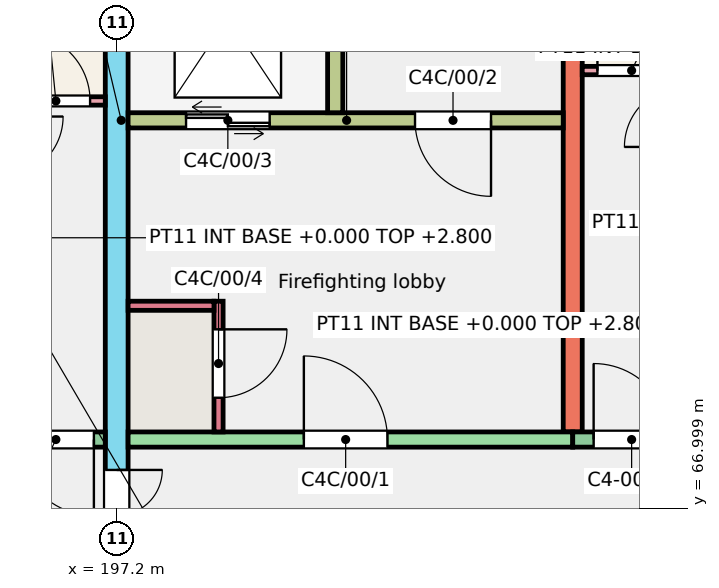
"""IFC4 building model, lengths in metres.
Left out: names, types, materials, properties, quantities, classifications, styles, units other than length and angle.
Written with IfcOpenShell. Run it as: python <this file> out.ifc"""

import sys

from ifc_helpers import new_model, si_unit, direction, frame, frame_2d, origin, place, context, subcontext, project, spatial, rectangle, extrude, element, fill, save


model = new_model("IFC4")
c1 = context("Model", 3, precision=1e-05, world=origin(), true_north=direction((0.0, 1.0)))
c2 = subcontext(c1, "Body", "Model", "MODEL_VIEW")
j1 = project(units=[si_unit("LENGTHUNIT", "METRE"), si_unit("PLANEANGLEUNIT", "RADIAN")], contexts=[c1])
p1 = place(None, origin())
s1 = spatial("IfcSite", under=j1, at=p1, CompositionType="ELEMENT")
p2 = place(p1, origin())
s2 = spatial("IfcBuilding", under=s1, at=p2, CompositionType="ELEMENT")
p3 = place(p2, origin())
s3 = spatial("IfcBuildingStorey", under=s2, at=p3, CompositionType="ELEMENT", Elevation=0.0)
p4 = place(p3, frame((197.2, 66.0, -0.25), z_axis=(0.0, 0.0, 1.0), x_axis=(0.0, 1.0, 0.0)))
e1 = element("IfcWall", 1, at=p4, inside=s3, PredefinedType="SHEAR", context=c2, shape_type="SweptSolid", body=[
    extrude(rectangle(XDim=11.0, YDim=0.3, at=frame_2d((5.5, 0.0))), origin(), (0.0, 0.0, 1.0), 3.25),
])
p5 = place(p4, frame((0.3, 0.0, 0.25)))
e2 = element("IfcOpeningElement", 2, at=p5, cuts=e1, PredefinedType="OPENING", context=c2, shape_type="SweptSolid", body=[
    extrude(rectangle(XDim=1.2, YDim=2.1, at=frame_2d((0.6, 1.05))), frame((0.0, 0.16, 0.0), z_axis=(0.0, -1.0, 0.0), x_axis=(1.0, 0.0, 0.0)), (0.0, 0.0, 1.0), 0.32),
])
p6 = place(p3, frame((203.2, 68.0, -0.25), z_axis=(0.0, 0.0, 1.0), x_axis=(0.0, 1.0, 0.0)))
e3 = element("IfcWall", 3, at=p6, inside=s3, PredefinedType="SHEAR", context=c2, shape_type="SweptSolid", body=[
    extrude(rectangle(XDim=9.0, YDim=0.25, at=frame_2d((4.5, 0.0))), origin(), (0.0, 0.0, 1.0), 3.25),
])
p7 = place(p3, frame((193.6, 67.9, -0.25), z_axis=(0.0, 0.0, 1.0), x_axis=(1.0, 0.0, 0.0)))
e4 = element("IfcWall", 4, at=p7, inside=s3, PredefinedType="SOLIDWALL", context=c2, shape_type="SweptSolid", body=[
    extrude(rectangle(XDim=3.45, YDim=0.2, at=frame_2d((1.725, 0.0))), origin(), (0.0, 0.0, 1.0), 3.25),
])
p8 = place(p7, frame((0.482, 0.0, 1.35)))
e5 = element("IfcOpeningElement", 5, at=p8, cuts=e4, PredefinedType="OPENING", context=c2, shape_type="SweptSolid", body=[
    extrude(rectangle(XDim=1.2, YDim=1.3, at=frame_2d((0.6, 0.65))), frame((0.0, 0.11, 0.0), z_axis=(0.0, -1.0, 0.0), x_axis=(1.0, 0.0, 0.0)), (0.0, 0.0, 1.0), 0.22),
])
p9 = place(p7, frame((2.3, 0.0, 0.25)))
e6 = element("IfcOpeningElement", 6, at=p9, cuts=e4, PredefinedType="OPENING", context=c2, shape_type="SweptSolid", body=[
    extrude(rectangle(XDim=1.0, YDim=2.1, at=frame_2d((0.5, 1.05))), frame((0.0, 0.11, 0.0), z_axis=(0.0, -1.0, 0.0), x_axis=(1.0, 0.0, 0.0)), (0.0, 0.0, 1.0), 0.22),
])
p10 = place(p3, frame((197.35, 67.9, -0.25), z_axis=(0.0, 0.0, 1.0), x_axis=(1.0, 0.0, 0.0)))
e7 = element("IfcWall", 7, at=p10, inside=s3, PredefinedType="SHEAR", context=c2, shape_type="SweptSolid", body=[
    extrude(rectangle(XDim=5.85, YDim=0.2, at=frame_2d((2.925, 0.0))), origin(), (0.0, 0.0, 1.0), 3.25),
])
p11 = place(p10, frame((2.312, 0.0, 0.25)))
e8 = element("IfcOpeningElement", 8, at=p11, cuts=e7, PredefinedType="OPENING", context=c2, shape_type="SweptSolid", body=[
    extrude(rectangle(XDim=1.1, YDim=2.1, at=frame_2d((0.55, 1.05))), frame((0.0, 0.11, 0.0), z_axis=(0.0, -1.0, 0.0), x_axis=(1.0, 0.0, 0.0)), (0.0, 0.0, 1.0), 0.22),
])
p12 = place(p3, frame((197.35, 72.1, -0.25), z_axis=(0.0, 0.0, 1.0), x_axis=(1.0, 0.0, 0.0)))
e9 = element("IfcWall", 9, at=p12, inside=s3, PredefinedType="SHEAR", context=c2, shape_type="SweptSolid", body=[
    extrude(rectangle(XDim=5.725, YDim=0.2, at=frame_2d((2.862, 0.0))), origin(), (0.0, 0.0, 1.0), 3.25),
])
p13 = place(p12, frame((3.775, 0.0, 0.25)))
e10 = element("IfcOpeningElement", 10, at=p13, cuts=e9, PredefinedType="OPENING", context=c2, shape_type="SweptSolid", body=[
    extrude(rectangle(XDim=1.0, YDim=2.1, at=frame_2d((0.5, 1.05))), frame((0.0, 0.11, 0.0), z_axis=(0.0, -1.0, 0.0), x_axis=(1.0, 0.0, 0.0)), (0.0, 0.0, 1.0), 0.22),
])
p14 = place(p12, frame((0.762, 0.0, 0.25)))
e11 = element("IfcOpeningElement", 11, at=p14, cuts=e9, PredefinedType="OPENING", context=c2, shape_type="SweptSolid", body=[
    extrude(rectangle(XDim=1.1, YDim=2.1, at=frame_2d((0.55, 1.05))), frame((0.0, 0.11, 0.0), z_axis=(0.0, -1.0, 0.0), x_axis=(1.0, 0.0, 0.0)), (0.0, 0.0, 1.0), 0.22),
])
p15 = place(p3, frame((200.075, 72.2, -0.25), z_axis=(0.0, 0.0, 1.0), x_axis=(0.0, 1.0, 0.0)))
e12 = element("IfcWall", 12, at=p15, inside=s3, PredefinedType="SHEAR", context=c2, shape_type="SweptSolid", body=[
    extrude(rectangle(XDim=4.8, YDim=0.2, at=frame_2d((2.4, 0.0))), origin(), (0.0, 0.0, 1.0), 3.25),
])
p16 = place(p3, frame((198.54, 68.0, -0.25), z_axis=(0.0, 0.0, 1.0), x_axis=(0.0, 1.0, 0.0)))
e13 = element("IfcWall", 13, at=p16, inside=s3, PredefinedType="SHEAR", context=c2, shape_type="SweptSolid", body=[
    extrude(rectangle(XDim=1.72, YDim=0.12, at=frame_2d((0.86, 0.0))), origin(), (0.0, 0.0, 1.0), 3.25),
])
p17 = place(p16, frame((0.45, 0.0, 0.25)))
e14 = element("IfcOpeningElement", 14, at=p17, cuts=e13, PredefinedType="OPENING", context=c2, shape_type="SweptSolid", body=[
    extrude(rectangle(XDim=0.9, YDim=2.1, at=frame_2d((0.45, 1.05))), frame((0.0, 0.07, 0.0), z_axis=(0.0, -1.0, 0.0), x_axis=(1.0, 0.0, 0.0)), (0.0, 0.0, 1.0), 0.14),
])
p18 = place(p3, frame((197.35, 69.66, -0.25), z_axis=(0.0, 0.0, 1.0), x_axis=(1.0, 0.0, 0.0)))
e15 = element("IfcWall", 15, at=p18, inside=s3, PredefinedType="SHEAR", context=c2, shape_type="SweptSolid", body=[
    extrude(rectangle(XDim=1.13, YDim=0.12, at=frame_2d((0.565, 0.0))), origin(), (0.0, 0.0, 1.0), 3.25),
])
p19 = place(p3, frame((203.2, 67.9, -0.25), z_axis=(0.0, 0.0, 1.0), x_axis=(1.0, 0.0, 0.0)))
e16 = element("IfcWall", 16, at=p19, inside=s3, PredefinedType="SOLIDWALL", context=c2, shape_type="SweptSolid", body=[
    extrude(rectangle(XDim=3.6, YDim=0.2, at=frame_2d((1.8, 0.0))), origin(), (0.0, 0.0, 1.0), 3.25),
])
p20 = place(p19, frame((1.905, 0.0, 1.35)))
e17 = element("IfcOpeningElement", 17, at=p20, cuts=e16, PredefinedType="OPENING", context=c2, shape_type="SweptSolid", body=[
    extrude(rectangle(XDim=1.2, YDim=1.3, at=frame_2d((0.6, 0.65))), frame((0.0, 0.11, 0.0), z_axis=(0.0, -1.0, 0.0), x_axis=(1.0, 0.0, 0.0)), (0.0, 0.0, 1.0), 0.22),
])
p21 = place(p19, frame((0.275, 0.0, 0.25)))
e18 = element("IfcOpeningElement", 18, at=p21, cuts=e16, PredefinedType="OPENING", context=c2, shape_type="SweptSolid", body=[
    extrude(rectangle(XDim=1.0, YDim=2.1, at=frame_2d((0.5, 1.05))), frame((0.0, 0.11, 0.0), z_axis=(0.0, -1.0, 0.0), x_axis=(1.0, 0.0, 0.0)), (0.0, 0.0, 1.0), 0.22),
])
p22 = place(p3, frame((197.2, 72.1, -1.4), z_axis=(0.0, 0.0, 1.0), x_axis=(1.0, 0.0, 0.0)))
e19 = element("IfcWall", 19, at=p22, inside=s3, PredefinedType="SHEAR", context=c2, shape_type="SweptSolid", body=[
    extrude(rectangle(XDim=2.975, YDim=0.2, at=frame_2d((1.488, 0.0))), origin(), (0.0, 0.0, 1.0), 1.15),
])
p23 = place(p3, frame((200.075, 72.2, -1.4), z_axis=(0.0, 0.0, 1.0), x_axis=(0.0, 1.0, 0.0)))
e20 = element("IfcWall", 20, at=p23, inside=s3, PredefinedType="SHEAR", context=c2, shape_type="SweptSolid", body=[
    extrude(rectangle(XDim=3.0, YDim=0.2, at=frame_2d((1.5, 0.0))), origin(), (0.0, 0.0, 1.0), 1.15),
])
p24 = place(p3, frame((197.275, 72.2, -1.4), z_axis=(0.0, 0.0, 1.0), x_axis=(0.0, 1.0, 0.0)))
e21 = element("IfcWall", 21, at=p24, inside=s3, PredefinedType="SHEAR", context=c2, shape_type="SweptSolid", body=[
    extrude(rectangle(XDim=3.0, YDim=0.15, at=frame_2d((1.5, 0.0))), origin(), (0.0, 0.0, 1.0), 1.15),
])
p25 = place(p3, frame((193.725, 72.355, 0.0), z_axis=(0.0, 0.0, 1.0), x_axis=(1.0, 0.0, 0.0)))
e22 = element("IfcWall", 22, at=p25, inside=s3, PredefinedType="PARTITIONING", context=c2, shape_type="SweptSolid", body=[
    extrude(rectangle(XDim=3.325, YDim=0.11, at=frame_2d((1.663, 0.0))), origin(), (0.0, 0.0, 1.0), 2.8),
])
p26 = place(p25, frame((2.225, 0.0, 0.0)))
e23 = element("IfcOpeningElement", 23, at=p26, cuts=e22, PredefinedType="OPENING", context=c2, shape_type="SweptSolid", body=[
    extrude(rectangle(XDim=0.9, YDim=2.1, at=frame_2d((0.45, 1.05))), frame((0.0, 0.065, 0.0), z_axis=(0.0, -1.0, 0.0), x_axis=(1.0, 0.0, 0.0)), (0.0, 0.0, 1.0), 0.13),
])
p27 = place(p3, frame((203.325, 72.755, 0.0), z_axis=(0.0, 0.0, 1.0), x_axis=(1.0, 0.0, 0.0)))
e24 = element("IfcWall", 24, at=p27, inside=s3, PredefinedType="PARTITIONING", context=c2, shape_type="SweptSolid", body=[
    extrude(rectangle(XDim=3.35, YDim=0.11, at=frame_2d((1.675, 0.0))), origin(), (0.0, 0.0, 1.0), 2.8),
])
p28 = place(p27, frame((0.2, 0.0, 0.0)))
e25 = element("IfcOpeningElement", 25, at=p28, cuts=e24, PredefinedType="OPENING", context=c2, shape_type="SweptSolid", body=[
    extrude(rectangle(XDim=0.9, YDim=2.1, at=frame_2d((0.45, 1.05))), frame((0.0, 0.065, 0.0), z_axis=(0.0, -1.0, 0.0), x_axis=(1.0, 0.0, 0.0)), (0.0, 0.0, 1.0), 0.13),
])
p29 = place(p9, origin())
e26 = element("IfcDoor", 26, at=p29, inside=s3, OperationType="SINGLE_SWING_RIGHT", PredefinedType="DOOR", context=c2, shape_type="SweptSolid", body=[
    extrude(rectangle(XDim=1.0, YDim=2.1, at=frame_2d((0.5, 1.05))), frame((0.0, 0.025, 0.0), z_axis=(0.0, -1.0, 0.0), x_axis=(1.0, 0.0, 0.0)), (0.0, 0.0, 1.0), 0.05),
])
fill(e6, e26)
p30 = place(p26, origin())
e27 = element("IfcDoor", 27, at=p30, inside=s3, OperationType="SINGLE_SWING_LEFT", PredefinedType="DOOR", context=c2, shape_type="SweptSolid", body=[
    extrude(rectangle(XDim=0.9, YDim=2.1, at=frame_2d((0.45, 1.05))), frame((0.0, 0.025, 0.0), z_axis=(0.0, -1.0, 0.0), x_axis=(1.0, 0.0, 0.0)), (0.0, 0.0, 1.0), 0.05),
])
fill(e23, e27)
p31 = place(p21, origin())
e28 = element("IfcDoor", 28, at=p31, inside=s3, OperationType="SINGLE_SWING_LEFT", PredefinedType="DOOR", context=c2, shape_type="SweptSolid", body=[
    extrude(rectangle(XDim=1.0, YDim=2.1, at=frame_2d((0.5, 1.05))), frame((0.0, 0.025, 0.0), z_axis=(0.0, -1.0, 0.0), x_axis=(1.0, 0.0, 0.0)), (0.0, 0.0, 1.0), 0.05),
])
fill(e18, e28)
p32 = place(p28, origin())
e29 = element("IfcDoor", 29, at=p32, inside=s3, OperationType="SINGLE_SWING_LEFT", PredefinedType="DOOR", context=c2, shape_type="SweptSolid", body=[
    extrude(rectangle(XDim=0.9, YDim=2.1, at=frame_2d((0.45, 1.05))), frame((0.0, 0.025, 0.0), z_axis=(0.0, -1.0, 0.0), x_axis=(1.0, 0.0, 0.0)), (0.0, 0.0, 1.0), 0.05),
])
fill(e25, e29)
p33 = place(p11, origin())
e30 = element("IfcDoor", 30, at=p33, inside=s3, OperationType="SINGLE_SWING_LEFT", PredefinedType="DOOR", context=c2, shape_type="SweptSolid", body=[
    extrude(rectangle(XDim=1.1, YDim=2.1, at=frame_2d((0.55, 1.05))), frame((0.0, 0.025, 0.0), z_axis=(0.0, -1.0, 0.0), x_axis=(1.0, 0.0, 0.0)), (0.0, 0.0, 1.0), 0.05),
])
fill(e8, e30)
p34 = place(p13, origin())
e31 = element("IfcDoor", 31, at=p34, inside=s3, OperationType="SINGLE_SWING_RIGHT", PredefinedType="DOOR", context=c2, shape_type="SweptSolid", body=[
    extrude(rectangle(XDim=1.0, YDim=2.1, at=frame_2d((0.5, 1.05))), frame((0.0, 0.025, 0.0), z_axis=(0.0, -1.0, 0.0), x_axis=(1.0, 0.0, 0.0)), (0.0, 0.0, 1.0), 0.05),
])
fill(e10, e31)
p35 = place(p14, origin())
e32 = element("IfcDoor", 32, at=p35, inside=s3, OperationType="DOUBLE_DOOR_SLIDING", PredefinedType="DOOR", context=c2, shape_type="SweptSolid", body=[
    extrude(rectangle(XDim=1.1, YDim=2.1, at=frame_2d((0.55, 1.05))), frame((0.0, 0.025, 0.0), z_axis=(0.0, -1.0, 0.0), x_axis=(1.0, 0.0, 0.0)), (0.0, 0.0, 1.0), 0.05),
])
fill(e11, e32)
p36 = place(p17, origin())
e33 = element("IfcDoor", 33, at=p36, inside=s3, OperationType="SINGLE_SWING_RIGHT", PredefinedType="DOOR", context=c2, shape_type="SweptSolid", body=[
    extrude(rectangle(XDim=0.9, YDim=2.1, at=frame_2d((0.45, 1.05))), frame((0.0, 0.025, 0.0), z_axis=(0.0, -1.0, 0.0), x_axis=(1.0, 0.0, 0.0)), (0.0, 0.0, 1.0), 0.05),
])
fill(e14, e33)
p37 = place(p5, origin())
e34 = element("IfcDoor", 34, at=p37, inside=s3, OperationType="DOUBLE_DOOR_SINGLE_SWING", PredefinedType="DOOR", context=c2, shape_type="SweptSolid", body=[
    extrude(rectangle(XDim=1.2, YDim=2.1, at=frame_2d((0.6, 1.05))), frame((0.0, 0.025, 0.0), z_axis=(0.0, -1.0, 0.0), x_axis=(1.0, 0.0, 0.0)), (0.0, 0.0, 1.0), 0.05),
])
fill(e2, e34)
save(model, sys.argv[1])
